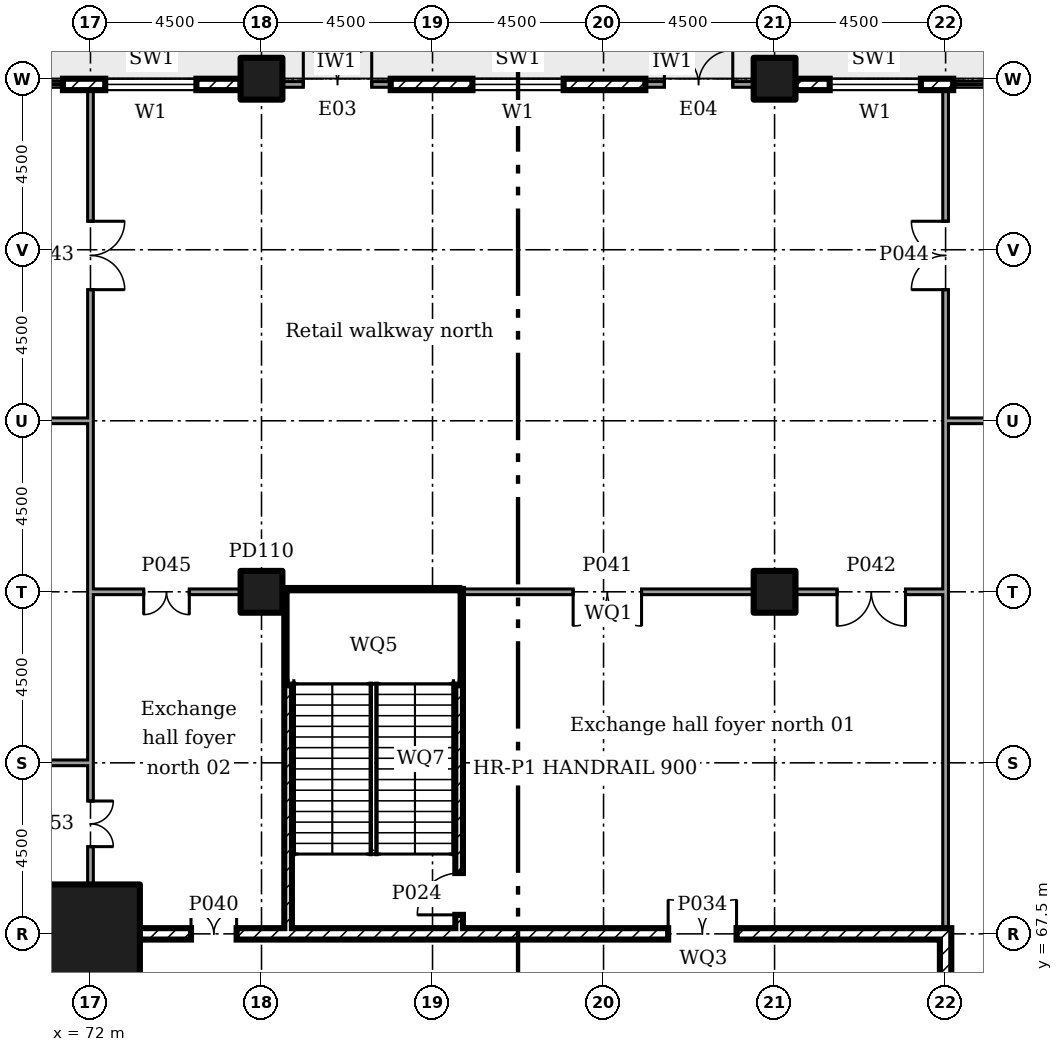
"""IFC4 building model, lengths in metres.
Left out: names, types, materials, properties, quantities, classifications, styles, units other than length and angle.
Written with IfcOpenShell. Run it as: python <this file> out.ifc"""

import sys

from ifc_helpers import new_model, si_unit, direction, frame, frame_2d, origin, origin_2d, place, context, subcontext, project, spatial, rectangle, extrude, element, fill, save


model = new_model("IFC4")
c1 = context("Model", 3, precision=1e-05, world=origin(), true_north=direction((0.0, 1.0)))
c2 = subcontext(c1, "Body", "Model", "MODEL_VIEW")
j1 = project(units=[si_unit("LENGTHUNIT", "METRE"), si_unit("PLANEANGLEUNIT", "RADIAN")], contexts=[c1])
p1 = place(None, origin())
s1 = spatial("IfcSite", under=j1, at=p1, CompositionType="ELEMENT")
p2 = place(p1, origin())
s2 = spatial("IfcBuilding", under=s1, at=p2, CompositionType="ELEMENT")
p3 = place(p2, frame((0.0, 0.0, 6.0)))
s3 = spatial("IfcBuildingStorey", under=s2, at=p3, CompositionType="ELEMENT", Elevation=6.0)
p4 = place(p3, frame((72.0, 67.5, 0.0)))
e1 = element("IfcColumn", 1, at=p4, inside=s3, PredefinedType="COLUMN", context=c2, shape_type="SweptSolid", body=[
    extrude(rectangle(XDim=2.6, YDim=2.6, at=origin_2d()), origin(), (0.0, 0.0, 1.0), 5.5),
])
for number, where in (
    (2, (76.5, 76.5, 0.0)),
    (3, (76.5, 90.0, 0.0)),
    (4, (90.0, 76.5, 0.0)),
    (5, (90.0, 90.0, 0.0)),
):
    element("IfcColumn", number, at=place(p3, frame(where)), inside=s3, PredefinedType="COLUMN", context=c2, shape_type="SweptSolid", body=[
        extrude(rectangle(XDim=1.1, YDim=1.1, at=origin_2d()), origin(), (0.0, 0.0, 1.0), 5.5),
    ])
p5 = place(p3, frame((94.7, 89.85, 0.0), z_axis=(0.0, 0.0, 1.0), x_axis=(-1.0, 0.0, 0.0)))
e6 = element("IfcWall", 6, at=p5, inside=s3, PredefinedType="ELEMENTEDWALL", context=c2, shape_type="SweptSolid", body=[
    extrude(rectangle(XDim=4.15, YDim=0.3, at=frame_2d((2.075, 0.0))), origin(), (0.0, 0.0, 1.0), 5.05),
])
p6 = place(p5, frame((0.85, 0.0, 0.45)))
e7 = element("IfcOpeningElement", 7, at=p6, cuts=e6, PredefinedType="OPENING", context=c2, shape_type="SweptSolid", body=[
    extrude(rectangle(XDim=2.4, YDim=2.4, at=frame_2d((1.2, 1.2))), frame((0.0, 0.16, 0.0), z_axis=(0.0, -1.0, 0.0), x_axis=(1.0, 0.0, 0.0)), (0.0, 0.0, 1.0), 0.32),
])
p7 = place(p3, frame((89.45, 89.85, 0.0), z_axis=(0.0, 0.0, 1.0), x_axis=(-1.0, 0.0, 0.0)))
e8 = element("IfcWall", 8, at=p7, inside=s3, PredefinedType="SOLIDWALL", context=c2, shape_type="SweptSolid", body=[
    extrude(rectangle(XDim=2.85, YDim=0.15, at=frame_2d((1.425, 0.0))), origin(), (0.0, 0.0, 1.0), 5.05),
])
p8 = place(p7, frame((0.55, 0.0, 0.0)))
e9 = element("IfcOpeningElement", 9, at=p8, cuts=e8, PredefinedType="OPENING", context=c2, shape_type="SweptSolid", body=[
    extrude(rectangle(XDim=1.8, YDim=2.4, at=frame_2d((0.9, 1.2))), frame((0.0, 0.085, 0.0), z_axis=(0.0, -1.0, 0.0), x_axis=(1.0, 0.0, 0.0)), (0.0, 0.0, 1.0), 0.17),
])
p9 = place(p3, frame((86.6, 89.85, 0.0), z_axis=(0.0, 0.0, 1.0), x_axis=(-1.0, 0.0, 0.0)))
e10 = element("IfcWall", 10, at=p9, inside=s3, PredefinedType="ELEMENTEDWALL", context=c2, shape_type="SweptSolid", body=[
    extrude(rectangle(XDim=6.7, YDim=0.3, at=frame_2d((3.35, 0.0))), origin(), (0.0, 0.0, 1.0), 5.05),
])
p10 = place(p9, frame((2.15, 0.0, 0.45)))
e11 = element("IfcOpeningElement", 11, at=p10, cuts=e10, PredefinedType="OPENING", context=c2, shape_type="SweptSolid", body=[
    extrude(rectangle(XDim=2.4, YDim=2.4, at=frame_2d((1.2, 1.2))), frame((0.0, 0.16, 0.0), z_axis=(0.0, -1.0, 0.0), x_axis=(1.0, 0.0, 0.0)), (0.0, 0.0, 1.0), 0.32),
])
p11 = place(p3, frame((79.9, 89.85, 0.0), z_axis=(0.0, 0.0, 1.0), x_axis=(-1.0, 0.0, 0.0)))
e12 = element("IfcWall", 12, at=p11, inside=s3, PredefinedType="SOLIDWALL", context=c2, shape_type="SweptSolid", body=[
    extrude(rectangle(XDim=2.85, YDim=0.15, at=frame_2d((1.425, 0.0))), origin(), (0.0, 0.0, 1.0), 5.05),
])
p12 = place(p11, frame((0.5, 0.0, 0.0)))
e13 = element("IfcOpeningElement", 13, at=p12, cuts=e12, PredefinedType="OPENING", context=c2, shape_type="SweptSolid", body=[
    extrude(rectangle(XDim=1.8, YDim=2.4, at=frame_2d((0.9, 1.2))), frame((0.0, 0.085, 0.0), z_axis=(0.0, -1.0, 0.0), x_axis=(1.0, 0.0, 0.0)), (0.0, 0.0, 1.0), 0.17),
])
p13 = place(p3, frame((75.95, 89.85, 0.0), z_axis=(0.0, 0.0, 1.0), x_axis=(-1.0, 0.0, 0.0)))
e14 = element("IfcWall", 14, at=p13, inside=s3, PredefinedType="ELEMENTEDWALL", context=c2, shape_type="SweptSolid", body=[
    extrude(rectangle(XDim=4.675, YDim=0.3, at=frame_2d((2.337, 0.0))), origin(), (0.0, 0.0, 1.0), 5.05),
])
p14 = place(p13, frame((1.163, 0.0, 0.45)))
e15 = element("IfcOpeningElement", 15, at=p14, cuts=e14, PredefinedType="OPENING", context=c2, shape_type="SweptSolid", body=[
    extrude(rectangle(XDim=2.4, YDim=2.4, at=frame_2d((1.2, 1.2))), frame((0.0, 0.16, 0.0), z_axis=(0.0, -1.0, 0.0), x_axis=(1.0, 0.0, 0.0)), (0.0, 0.0, 1.0), 0.32),
])
p15 = place(p3, frame((81.6, 67.5, 0.0)))
e16 = element("IfcWall", 16, at=p15, inside=s3, PredefinedType="SOLIDWALL", context=c2, shape_type="SweptSolid", body=[
    extrude(rectangle(XDim=13.05, YDim=0.3, at=frame_2d((6.525, 0.0))), origin(), (0.0, 0.0, 1.0), 5.5),
])
p16 = place(p15, frame((5.6, 0.0, 0.0)))
e17 = element("IfcOpeningElement", 17, at=p16, cuts=e16, PredefinedType="OPENING", context=c2, shape_type="SweptSolid", body=[
    extrude(rectangle(XDim=1.8, YDim=2.1, at=frame_2d((0.9, 1.05))), frame((0.0, 0.16, 0.0), z_axis=(0.0, -1.0, 0.0), x_axis=(1.0, 0.0, 0.0)), (0.0, 0.0, 1.0), 0.32),
])
p17 = place(p3, frame((94.5, 58.425, 0.0), z_axis=(0.0, 0.0, 1.0), x_axis=(0.0, 1.0, 0.0)))
e18 = element("IfcWall", 18, at=p17, inside=s3, PredefinedType="SOLIDWALL", context=c2, shape_type="SweptSolid", body=[
    extrude(rectangle(XDim=8.925, YDim=0.3, at=frame_2d((4.462, 0.0))), origin(), (0.0, 0.0, 1.0), 10.05),
])
p18 = place(p3, frame((73.295, 67.5, 0.0)))
e19 = element("IfcWall", 19, at=p18, inside=s3, PredefinedType="SOLIDWALL", context=c2, shape_type="SweptSolid", body=[
    extrude(rectangle(XDim=4.005, YDim=0.3, at=frame_2d((2.002, 0.0))), origin(), (0.0, 0.0, 1.0), 5.5),
])
p19 = place(p18, frame((1.35, 0.0, 0.0)))
e20 = element("IfcOpeningElement", 20, at=p19, cuts=e19, PredefinedType="OPENING", context=c2, shape_type="SweptSolid", body=[
    extrude(rectangle(XDim=1.2, YDim=2.1, at=frame_2d((0.6, 1.05))), frame((0.0, 0.16, 0.0), z_axis=(0.0, -1.0, 0.0), x_axis=(1.0, 0.0, 0.0)), (0.0, 0.0, 1.0), 0.32),
])
p20 = place(p3, frame((77.2, 67.5, 0.0)))
e21 = element("IfcWall", 21, at=p20, inside=s3, PredefinedType="SOLIDWALL", context=c2, shape_type="SweptSolid", body=[
    extrude(rectangle(XDim=4.5, YDim=0.3, at=frame_2d((2.25, 0.0))), origin(), (0.0, 0.0, 1.0), 5.5),
])
p21 = place(p3, frame((81.8, 76.5, 0.0)))
e22 = element("IfcWall", 22, at=p21, inside=s3, PredefinedType="PARTITIONING", context=c2, shape_type="SweptSolid", body=[
    extrude(rectangle(XDim=7.655, YDim=0.15, at=frame_2d((3.828, 0.0))), origin(), (0.0, 0.0, 1.0), 5.05),
])
p22 = place(p21, frame((2.9, 0.0, 0.0)))
e23 = element("IfcOpeningElement", 23, at=p22, cuts=e22, PredefinedType="OPENING", context=c2, shape_type="SweptSolid", body=[
    extrude(rectangle(XDim=1.8, YDim=2.1, at=frame_2d((0.9, 1.05))), frame((0.0, 0.085, 0.0), z_axis=(0.0, -1.0, 0.0), x_axis=(1.0, 0.0, 0.0)), (0.0, 0.0, 1.0), 0.17),
])
p23 = place(p3, frame((90.545, 76.5, 0.0)))
e24 = element("IfcWall", 24, at=p23, inside=s3, PredefinedType="PARTITIONING", context=c2, shape_type="SweptSolid", body=[
    extrude(rectangle(XDim=4.03, YDim=0.15, at=frame_2d((2.015, 0.0))), origin(), (0.0, 0.0, 1.0), 5.05),
])
p24 = place(p23, frame((1.1, 0.0, 0.0)))
e25 = element("IfcOpeningElement", 25, at=p24, cuts=e24, PredefinedType="OPENING", context=c2, shape_type="SweptSolid", body=[
    extrude(rectangle(XDim=1.8, YDim=2.1, at=frame_2d((0.9, 1.05))), frame((0.0, 0.085, 0.0), z_axis=(0.0, -1.0, 0.0), x_axis=(1.0, 0.0, 0.0)), (0.0, 0.0, 1.0), 0.17),
])
p25 = place(p3, frame((94.5, 67.5, 0.0), z_axis=(0.0, 0.0, 1.0), x_axis=(0.0, 1.0, 0.0)))
e26 = element("IfcWall", 26, at=p25, inside=s3, PredefinedType="PARTITIONING", context=c2, shape_type="SweptSolid", body=[
    extrude(rectangle(XDim=8.925, YDim=0.15, at=frame_2d((4.462, 0.0))), origin(), (0.0, 0.0, 1.0), 5.05),
])
p26 = place(p3, frame((81.7, 67.65, 0.0), z_axis=(0.0, 0.0, 1.0), x_axis=(0.0, 1.0, 0.0)))
e27 = element("IfcWall", 27, at=p26, inside=s3, PredefinedType="SOLIDWALL", context=c2, shape_type="SweptSolid", body=[
    extrude(rectangle(XDim=8.925, YDim=0.2, at=frame_2d((4.462, 0.0))), origin(), (0.0, 0.0, 1.0), 5.05),
])
p27 = place(p26, frame((0.35, 0.0, 0.0)))
e28 = element("IfcOpeningElement", 28, at=p27, cuts=e27, PredefinedType="OPENING", context=c2, shape_type="SweptSolid", body=[
    extrude(rectangle(XDim=1.1, YDim=2.1, at=frame_2d((0.55, 1.05))), frame((0.0, 0.11, 0.0), z_axis=(0.0, -1.0, 0.0), x_axis=(1.0, 0.0, 0.0)), (0.0, 0.0, 1.0), 0.22),
])
p28 = place(p3, frame((72.0, 80.925, 0.0), z_axis=(0.0, 0.0, 1.0), x_axis=(0.0, 1.0, 0.0)))
e29 = element("IfcWall", 29, at=p28, inside=s3, PredefinedType="PARTITIONING", context=c2, shape_type="SweptSolid", body=[
    extrude(rectangle(XDim=8.775, YDim=0.15, at=frame_2d((4.387, 0.0))), origin(), (0.0, 0.0, 1.0), 5.05),
])
p29 = place(p28, frame((3.525, 0.0, 0.0)))
e30 = element("IfcOpeningElement", 30, at=p29, cuts=e29, PredefinedType="OPENING", context=c2, shape_type="SweptSolid", body=[
    extrude(rectangle(XDim=1.8, YDim=2.1, at=frame_2d((0.9, 1.05))), frame((0.0, 0.085, 0.0), z_axis=(0.0, -1.0, 0.0), x_axis=(1.0, 0.0, 0.0)), (0.0, 0.0, 1.0), 0.17),
])
p30 = place(p3, frame((94.5, 80.925, 0.0), z_axis=(0.0, 0.0, 1.0), x_axis=(0.0, 1.0, 0.0)))
e31 = element("IfcWall", 31, at=p30, inside=s3, PredefinedType="PARTITIONING", context=c2, shape_type="SweptSolid", body=[
    extrude(rectangle(XDim=8.775, YDim=0.15, at=frame_2d((4.387, 0.0))), origin(), (0.0, 0.0, 1.0), 5.05),
])
p31 = place(p30, frame((3.525, 0.0, 0.0)))
e32 = element("IfcOpeningElement", 32, at=p31, cuts=e31, PredefinedType="OPENING", context=c2, shape_type="SweptSolid", body=[
    extrude(rectangle(XDim=1.8, YDim=2.1, at=frame_2d((0.9, 1.05))), frame((0.0, 0.085, 0.0), z_axis=(0.0, -1.0, 0.0), x_axis=(1.0, 0.0, 0.0)), (0.0, 0.0, 1.0), 0.17),
])
p32 = place(p3, frame((72.0, 76.425, 0.0), z_axis=(0.0, 0.0, 1.0), x_axis=(0.0, 1.0, 0.0)))
e33 = element("IfcWall", 33, at=p32, inside=s3, PredefinedType="PARTITIONING", context=c2, shape_type="SweptSolid", body=[
    extrude(rectangle(XDim=4.575, YDim=0.15, at=frame_2d((2.288, 0.0))), origin(), (0.0, 0.0, 1.0), 5.05),
])
p33 = place(p3, frame((94.5, 76.5, 0.0), z_axis=(0.0, 0.0, 1.0), x_axis=(0.0, 1.0, 0.0)))
e34 = element("IfcWall", 34, at=p33, inside=s3, PredefinedType="PARTITIONING", context=c2, shape_type="SweptSolid", body=[
    extrude(rectangle(XDim=4.5, YDim=0.15, at=frame_2d((2.25, 0.0))), origin(), (0.0, 0.0, 1.0), 5.05),
])
p34 = place(p3, frame((72.075, 76.5, 0.0)))
e35 = element("IfcWall", 35, at=p34, inside=s3, PredefinedType="PARTITIONING", context=c2, shape_type="SweptSolid", body=[
    extrude(rectangle(XDim=3.88, YDim=0.15, at=frame_2d((1.94, 0.0))), origin(), (0.0, 0.0, 1.0), 5.05),
])
p35 = place(p34, frame((1.325, 0.0, 0.0)))
e36 = element("IfcOpeningElement", 36, at=p35, cuts=e35, PredefinedType="OPENING", context=c2, shape_type="SweptSolid", body=[
    extrude(rectangle(XDim=1.2, YDim=2.1, at=frame_2d((0.6, 1.05))), frame((0.0, 0.085, 0.0), z_axis=(0.0, -1.0, 0.0), x_axis=(1.0, 0.0, 0.0)), (0.0, 0.0, 1.0), 0.17),
])
p36 = place(p3, frame((77.1, 76.5, 0.0)))
e37 = element("IfcWall", 37, at=p36, inside=s3, PredefinedType="SOLIDWALL", context=c2, shape_type="SweptSolid", body=[
    extrude(rectangle(XDim=4.6, YDim=0.2, at=frame_2d((2.3, 0.0))), origin(), (0.0, 0.0, 1.0), 5.05),
])
p37 = place(p3, frame((45.0, 81.0, 0.0)))
e38 = element("IfcWall", 38, at=p37, inside=s3, PredefinedType="PARTITIONING", context=c2, shape_type="SweptSolid", body=[
    extrude(rectangle(XDim=26.925, YDim=0.15, at=frame_2d((13.462, 0.0))), origin(), (0.0, 0.0, 1.0), 5.05),
])
p38 = place(p37, frame((13.0, 0.0, 0.0)))
e39 = element("IfcOpeningElement", 39, at=p38, cuts=e38, PredefinedType="OPENING", context=c2, shape_type="SweptSolid", body=[
    extrude(rectangle(XDim=1.0, YDim=2.1, at=frame_2d((0.5, 1.05))), frame((0.0, 0.085, 0.0), z_axis=(0.0, -1.0, 0.0), x_axis=(1.0, 0.0, 0.0)), (0.0, 0.0, 1.0), 0.17),
])
p39 = place(p3, frame((94.575, 81.0, 0.0)))
e40 = element("IfcWall", 40, at=p39, inside=s3, PredefinedType="PARTITIONING", context=c2, shape_type="SweptSolid", body=[
    extrude(rectangle(XDim=18.0, YDim=0.15, at=frame_2d((9.0, 0.0))), origin(), (0.0, 0.0, 1.0), 5.05),
])
p40 = place(p39, frame((8.425, 0.0, 0.0)))
e41 = element("IfcOpeningElement", 41, at=p40, cuts=e40, PredefinedType="OPENING", context=c2, shape_type="SweptSolid", body=[
    extrude(rectangle(XDim=1.0, YDim=2.1, at=frame_2d((0.5, 1.05))), frame((0.0, 0.085, 0.0), z_axis=(0.0, -1.0, 0.0), x_axis=(1.0, 0.0, 0.0)), (0.0, 0.0, 1.0), 0.17),
])
p41 = place(p3, frame((68.795, 72.0, 0.0)))
e42 = element("IfcWall", 42, at=p41, inside=s3, PredefinedType="PARTITIONING", context=c2, shape_type="SweptSolid", body=[
    extrude(rectangle(XDim=3.28, YDim=0.15, at=frame_2d((1.64, 0.0))), origin(), (0.0, 0.0, 1.0), 5.05),
])
p42 = place(p3, frame((72.0, 72.0, 0.0), z_axis=(0.0, 0.0, 1.0), x_axis=(0.0, 1.0, 0.0)))
e43 = element("IfcWall", 43, at=p42, inside=s3, PredefinedType="PARTITIONING", context=c2, shape_type="SweptSolid", body=[
    extrude(rectangle(XDim=4.5, YDim=0.15, at=frame_2d((2.25, 0.0))), origin(), (0.0, 0.0, 1.0), 5.05),
])
p43 = place(p3, frame((72.0, 68.795, 0.0), z_axis=(0.0, 0.0, 1.0), x_axis=(0.0, 1.0, 0.0)))
e44 = element("IfcWall", 44, at=p43, inside=s3, PredefinedType="PARTITIONING", context=c2, shape_type="SweptSolid", body=[
    extrude(rectangle(XDim=3.13, YDim=0.15, at=frame_2d((1.565, 0.0))), origin(), (0.0, 0.0, 1.0), 5.05),
])
p44 = place(p43, frame((1.0, 0.0, 0.0)))
e45 = element("IfcOpeningElement", 45, at=p44, cuts=e44, PredefinedType="OPENING", context=c2, shape_type="SweptSolid", body=[
    extrude(rectangle(XDim=1.2, YDim=2.1, at=frame_2d((0.6, 1.05))), frame((0.0, 0.085, 0.0), z_axis=(0.0, -1.0, 0.0), x_axis=(1.0, 0.0, 0.0)), (0.0, 0.0, 1.0), 0.17),
])
p45 = place(p3, frame((77.2, 67.65, 0.0), z_axis=(0.0, 0.0, 1.0), x_axis=(0.0, 1.0, 0.0)))
e46 = element("IfcWall", 46, at=p45, inside=s3, PredefinedType="SOLIDWALL", context=c2, shape_type="SweptSolid", body=[
    extrude(rectangle(XDim=8.75, YDim=0.2, at=frame_2d((4.375, 0.0))), origin(), (0.0, 0.0, 1.0), 5.05),
])
for number, where in (
    (47, (77.3, 74.46, -3.0)),
    (48, (77.3, 75.8, -3.0)),
):
    element("IfcWall", number, at=place(p3, frame(where)), inside=s3, PredefinedType="SOLIDWALL", context=c2, shape_type="SweptSolid", body=[
        extrude(rectangle(XDim=4.3, YDim=0.2, at=frame_2d((2.15, 0.0))), origin(), (0.0, 0.0, 1.0), 5.55),
    ])
p46 = place(p6, origin())
e49 = element("IfcWindow", 49, at=p46, inside=s3, PartitioningType="SINGLE_PANEL", PredefinedType="WINDOW", context=c2, shape_type="SweptSolid", body=[
    extrude(rectangle(XDim=2.4, YDim=2.4, at=frame_2d((1.2, 1.2))), frame((0.0, 0.03, 0.0), z_axis=(0.0, -1.0, 0.0), x_axis=(1.0, 0.0, 0.0)), (0.0, 0.0, 1.0), 0.06),
])
fill(e7, e49)
p47 = place(p8, frame((1.8, 0.0, 0.0), x_axis=(-1.0, 0.0, 0.0)))
e50 = element("IfcDoor", 50, at=p47, inside=s3, OperationType="DOUBLE_DOOR_DOUBLE_SWING", PredefinedType="NOTDEFINED", context=c2, shape_type="SweptSolid", body=[
    extrude(rectangle(XDim=1.8, YDim=2.4, at=frame_2d((0.9, 1.2))), frame((0.0, 0.025, 0.0), z_axis=(0.0, -1.0, 0.0), x_axis=(1.0, 0.0, 0.0)), (0.0, 0.0, 1.0), 0.05),
])
fill(e9, e50)
p48 = place(p10, origin())
e51 = element("IfcWindow", 51, at=p48, inside=s3, PartitioningType="SINGLE_PANEL", PredefinedType="WINDOW", context=c2, shape_type="SweptSolid", body=[
    extrude(rectangle(XDim=2.4, YDim=2.4, at=frame_2d((1.2, 1.2))), frame((0.0, 0.03, 0.0), z_axis=(0.0, -1.0, 0.0), x_axis=(1.0, 0.0, 0.0)), (0.0, 0.0, 1.0), 0.06),
])
fill(e11, e51)
p49 = place(p12, frame((1.8, 0.0, 0.0), x_axis=(-1.0, 0.0, 0.0)))
e52 = element("IfcDoor", 52, at=p49, inside=s3, OperationType="DOUBLE_DOOR_DOUBLE_SWING", PredefinedType="NOTDEFINED", context=c2, shape_type="SweptSolid", body=[
    extrude(rectangle(XDim=1.8, YDim=2.4, at=frame_2d((0.9, 1.2))), frame((0.0, 0.025, 0.0), z_axis=(0.0, -1.0, 0.0), x_axis=(1.0, 0.0, 0.0)), (0.0, 0.0, 1.0), 0.05),
])
fill(e13, e52)
p50 = place(p14, origin())
e53 = element("IfcWindow", 53, at=p50, inside=s3, PartitioningType="SINGLE_PANEL", PredefinedType="WINDOW", context=c2, shape_type="SweptSolid", body=[
    extrude(rectangle(XDim=2.4, YDim=2.4, at=frame_2d((1.2, 1.2))), frame((0.0, 0.03, 0.0), z_axis=(0.0, -1.0, 0.0), x_axis=(1.0, 0.0, 0.0)), (0.0, 0.0, 1.0), 0.06),
])
fill(e15, e53)
p51 = place(p27, origin())
e54 = element("IfcDoor", 54, at=p51, inside=s3, OperationType="SINGLE_SWING_RIGHT", PredefinedType="DOOR", context=c2, shape_type="SweptSolid", body=[
    extrude(rectangle(XDim=1.1, YDim=2.1, at=frame_2d((0.55, 1.05))), frame((0.0, 0.025, 0.0), z_axis=(0.0, -1.0, 0.0), x_axis=(1.0, 0.0, 0.0)), (0.0, 0.0, 1.0), 0.05),
])
fill(e28, e54)
p52 = place(p16, origin())
e55 = element("IfcDoor", 55, at=p52, inside=s3, OperationType="DOUBLE_DOOR_SINGLE_SWING", PredefinedType="DOOR", context=c2, shape_type="SweptSolid", body=[
    extrude(rectangle(XDim=1.8, YDim=2.1, at=frame_2d((0.9, 1.05))), frame((0.0, 0.025, 0.0), z_axis=(0.0, -1.0, 0.0), x_axis=(1.0, 0.0, 0.0)), (0.0, 0.0, 1.0), 0.05),
])
fill(e17, e55)
p53 = place(p19, origin())
e56 = element("IfcDoor", 56, at=p53, inside=s3, OperationType="DOUBLE_DOOR_SINGLE_SWING", PredefinedType="DOOR", context=c2, shape_type="SweptSolid", body=[
    extrude(rectangle(XDim=1.2, YDim=2.1, at=frame_2d((0.6, 1.05))), frame((0.0, 0.025, 0.0), z_axis=(0.0, -1.0, 0.0), x_axis=(1.0, 0.0, 0.0)), (0.0, 0.0, 1.0), 0.05),
])
fill(e20, e56)
p54 = place(p22, frame((1.8, 0.0, 0.0), x_axis=(-1.0, 0.0, 0.0)))
e57 = element("IfcDoor", 57, at=p54, inside=s3, OperationType="DOUBLE_DOOR_SINGLE_SWING", PredefinedType="DOOR", context=c2, shape_type="SweptSolid", body=[
    extrude(rectangle(XDim=1.8, YDim=2.1, at=frame_2d((0.9, 1.05))), frame((0.0, 0.025, 0.0), z_axis=(0.0, -1.0, 0.0), x_axis=(1.0, 0.0, 0.0)), (0.0, 0.0, 1.0), 0.05),
])
fill(e23, e57)
p55 = place(p24, frame((1.8, 0.0, 0.0), x_axis=(-1.0, 0.0, 0.0)))
e58 = element("IfcDoor", 58, at=p55, inside=s3, OperationType="DOUBLE_DOOR_SINGLE_SWING", PredefinedType="DOOR", context=c2, shape_type="SweptSolid", body=[
    extrude(rectangle(XDim=1.8, YDim=2.1, at=frame_2d((0.9, 1.05))), frame((0.0, 0.025, 0.0), z_axis=(0.0, -1.0, 0.0), x_axis=(1.0, 0.0, 0.0)), (0.0, 0.0, 1.0), 0.05),
])
fill(e25, e58)
p56 = place(p29, frame((1.8, 0.0, 0.0), x_axis=(-1.0, 0.0, 0.0)))
e59 = element("IfcDoor", 59, at=p56, inside=s3, OperationType="DOUBLE_DOOR_SINGLE_SWING", PredefinedType="DOOR", context=c2, shape_type="SweptSolid", body=[
    extrude(rectangle(XDim=1.8, YDim=2.1, at=frame_2d((0.9, 1.05))), frame((0.0, 0.025, 0.0), z_axis=(0.0, -1.0, 0.0), x_axis=(1.0, 0.0, 0.0)), (0.0, 0.0, 1.0), 0.05),
])
fill(e30, e59)
p57 = place(p31, origin())
e60 = element("IfcDoor", 60, at=p57, inside=s3, OperationType="DOUBLE_DOOR_SINGLE_SWING", PredefinedType="DOOR", context=c2, shape_type="SweptSolid", body=[
    extrude(rectangle(XDim=1.8, YDim=2.1, at=frame_2d((0.9, 1.05))), frame((0.0, 0.025, 0.0), z_axis=(0.0, -1.0, 0.0), x_axis=(1.0, 0.0, 0.0)), (0.0, 0.0, 1.0), 0.05),
])
fill(e32, e60)
p58 = place(p35, frame((1.2, 0.0, 0.0), x_axis=(-1.0, 0.0, 0.0)))
e61 = element("IfcDoor", 61, at=p58, inside=s3, OperationType="DOUBLE_DOOR_SINGLE_SWING", PredefinedType="DOOR", context=c2, shape_type="SweptSolid", body=[
    extrude(rectangle(XDim=1.2, YDim=2.1, at=frame_2d((0.6, 1.05))), frame((0.0, 0.025, 0.0), z_axis=(0.0, -1.0, 0.0), x_axis=(1.0, 0.0, 0.0)), (0.0, 0.0, 1.0), 0.05),
])
fill(e36, e61)
p59 = place(p44, frame((1.2, 0.0, 0.0), x_axis=(-1.0, 0.0, 0.0)))
e62 = element("IfcDoor", 62, at=p59, inside=s3, OperationType="DOUBLE_DOOR_SINGLE_SWING", PredefinedType="DOOR", context=c2, shape_type="SweptSolid", body=[
    extrude(rectangle(XDim=1.2, YDim=2.1, at=frame_2d((0.6, 1.05))), frame((0.0, 0.025, 0.0), z_axis=(0.0, -1.0, 0.0), x_axis=(1.0, 0.0, 0.0)), (0.0, 0.0, 1.0), 0.05),
])
fill(e45, e62)
save(model, sys.argv[1])
